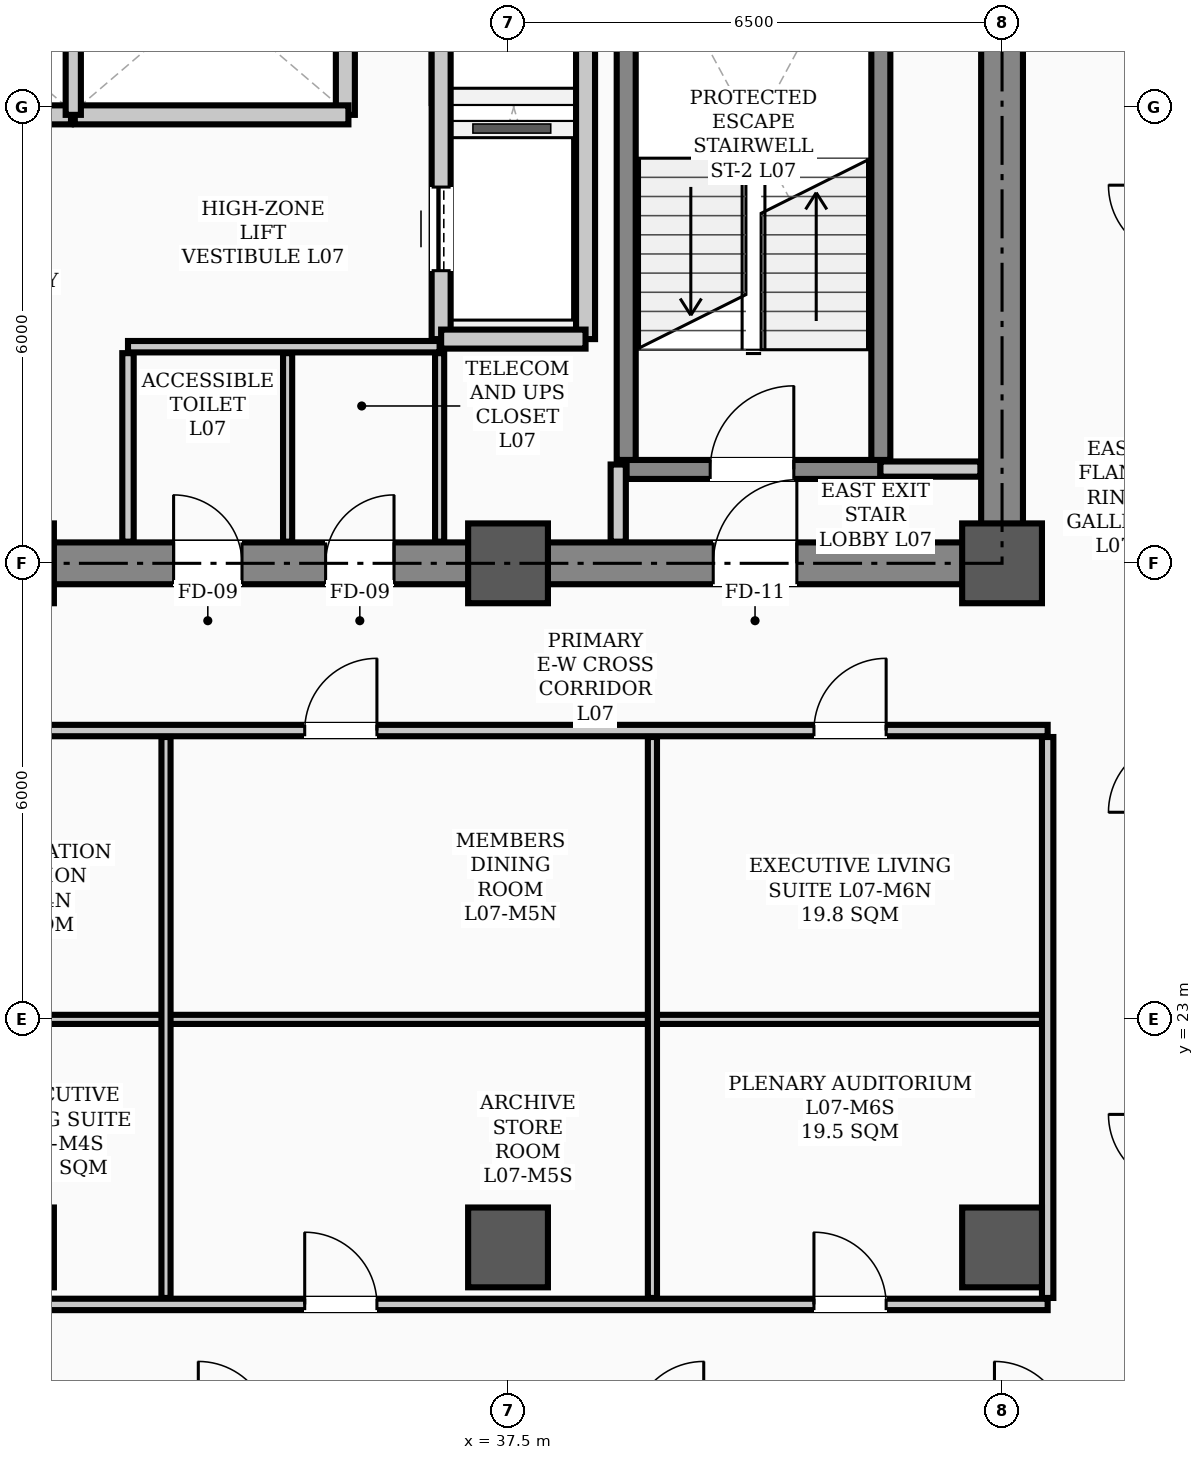
"""IFC4 building model, lengths in metres.
Left out: names, types, materials, properties, quantities, classifications, styles, units other than length and angle.
Written with IfcOpenShell. Run it as: python <this file> out.ifc"""

import sys

from ifc_helpers import new_model, si_unit, direction, frame, frame_2d, origin, origin_2d, place, context, subcontext, project, spatial, rectangle, hollow_rectangle, extrude, element, fill, save


model = new_model("IFC4")
c1 = context("Model", 3, precision=1e-05, world=origin(), true_north=direction((0.0, 1.0)))
c2 = subcontext(c1, "Body", "Model", "MODEL_VIEW")
j1 = project(units=[si_unit("LENGTHUNIT", "METRE"), si_unit("PLANEANGLEUNIT", "RADIAN")], contexts=[c1])
p1 = place(None, origin())
s1 = spatial("IfcSite", under=j1, at=p1, CompositionType="ELEMENT")
p2 = place(p1, origin())
s2 = spatial("IfcBuilding", under=s1, at=p2, CompositionType="ELEMENT")
p3 = place(p2, frame((0.0, 0.0, 30.4)))
s3 = spatial("IfcBuildingStorey", under=s2, at=p3, CompositionType="ELEMENT", Elevation=30.4)
for number, where, z_axis, x_axis in (
    (1, (31.0, 29.0, 0.0), (0.0, 0.0, 1.0), (1.0, 0.0, 0.0)),
    (2, (37.5, 29.0, 0.0), (0.0, 0.0, 1.0), (1.0, 0.0, 0.0)),
    (3, (44.0, 29.0, 0.0), (0.0, 0.0, 1.0), (1.0, 0.0, 0.0)),
    (4, (31.0, 20.0, 0.0), (0.0, 0.0, 1.0), (1.0, 0.0, 0.0)),
    (5, (37.5, 20.0, 0.0), (0.0, 0.0, 1.0), (1.0, 0.0, 0.0)),
    (6, (44.0, 20.0, 0.0), (0.0, 0.0, 1.0), (1.0, 0.0, 0.0)),
):
    element("IfcColumn", number, at=place(p3, frame(where, z_axis=z_axis, x_axis=x_axis)), inside=s3, PredefinedType="COLUMN", context=c2, shape_type="SweptSolid", body=[
        extrude(hollow_rectangle(XDim=1.05, YDim=1.05, WallThickness=0.038, InnerFilletRadius=0.019, OuterFilletRadius=0.057, at=origin_2d()), origin(), (0.0, 0.0, 1.0), 3.9),
    ])
p4 = place(p3, frame((13.5, 29.0, 0.0), z_axis=(0.0, 0.0, 1.0), x_axis=(1.0, 0.0, 0.0)))
e7 = element("IfcWall", 7, at=p4, inside=s3, PredefinedType="SHEAR", context=c2, shape_type="SweptSolid", body=[
    extrude(rectangle(XDim=30.5, YDim=0.55, at=frame_2d((15.25, 0.0))), origin(), (0.0, 0.0, 1.0), 3.72),
])
p5 = place(p4, frame((1.75, 0.0, 0.0)))
e8 = element("IfcOpeningElement", 8, at=p5, cuts=e7, PredefinedType="OPENING", context=c2, shape_type="SweptSolid", body=[
    extrude(rectangle(XDim=1.1, YDim=2.08, at=frame_2d((0.55, 1.04))), frame((0.0, 0.285, 0.0), z_axis=(0.0, -1.0, 0.0), x_axis=(1.0, 0.0, 0.0)), (0.0, 0.0, 1.0), 0.57),
])
p6 = place(p4, frame((26.7, 0.0, 0.0)))
e9 = element("IfcOpeningElement", 9, at=p6, cuts=e7, PredefinedType="OPENING", context=c2, shape_type="SweptSolid", body=[
    extrude(rectangle(XDim=1.1, YDim=2.08, at=frame_2d((0.55, 1.04))), frame((0.0, 0.285, 0.0), z_axis=(0.0, -1.0, 0.0), x_axis=(1.0, 0.0, 0.0)), (0.0, 0.0, 1.0), 0.57),
])
p7 = place(p4, frame((6.8, 0.0, 0.0)))
e10 = element("IfcOpeningElement", 10, at=p7, cuts=e7, PredefinedType="OPENING", context=c2, shape_type="SweptSolid", body=[
    extrude(rectangle(XDim=1.1, YDim=2.08, at=frame_2d((0.55, 1.04))), frame((0.0, 0.285, 0.0), z_axis=(0.0, -1.0, 0.0), x_axis=(1.0, 0.0, 0.0)), (0.0, 0.0, 1.0), 0.57),
])
p8 = place(p4, frame((13.2, 0.0, 0.0)))
e11 = element("IfcOpeningElement", 11, at=p8, cuts=e7, PredefinedType="OPENING", context=c2, shape_type="SweptSolid", body=[
    extrude(rectangle(XDim=1.6, YDim=2.08, at=frame_2d((0.8, 1.04))), frame((0.0, 0.285, 0.0), z_axis=(0.0, -1.0, 0.0), x_axis=(1.0, 0.0, 0.0)), (0.0, 0.0, 1.0), 0.57),
])
p9 = place(p4, frame((19.6, 0.0, 0.0)))
e12 = element("IfcOpeningElement", 12, at=p9, cuts=e7, PredefinedType="OPENING", context=c2, shape_type="SweptSolid", body=[
    extrude(rectangle(XDim=0.9, YDim=2.08, at=frame_2d((0.45, 1.04))), frame((0.0, 0.285, 0.0), z_axis=(0.0, -1.0, 0.0), x_axis=(1.0, 0.0, 0.0)), (0.0, 0.0, 1.0), 0.57),
])
p10 = place(p4, frame((21.6, 0.0, 0.0)))
e13 = element("IfcOpeningElement", 13, at=p10, cuts=e7, PredefinedType="OPENING", context=c2, shape_type="SweptSolid", body=[
    extrude(rectangle(XDim=0.9, YDim=2.08, at=frame_2d((0.45, 1.04))), frame((0.0, 0.285, 0.0), z_axis=(0.0, -1.0, 0.0), x_axis=(1.0, 0.0, 0.0)), (0.0, 0.0, 1.0), 0.57),
])
p11 = place(p3, frame((44.0, 29.35, 0.0), z_axis=(0.0, 0.0, 1.0), x_axis=(0.0, 1.0, 0.0)))
e14 = element("IfcWall", 14, at=p11, inside=s3, PredefinedType="SHEAR", context=c2, shape_type="SweptSolid", body=[
    extrude(rectangle(XDim=8.6, YDim=0.55, at=frame_2d((4.3, 0.0))), origin(), (0.0, 0.0, 1.0), 3.72),
])
p12 = place(p3, frame((39.06, 30.235, 0.0), z_axis=(0.0, 0.0, 1.0), x_axis=(1.0, 0.0, 0.0)))
e15 = element("IfcWall", 15, at=p12, inside=s3, PredefinedType="STANDARD", context=c2, shape_type="SweptSolid", body=[
    extrude(rectangle(XDim=3.34, YDim=0.25, at=frame_2d((1.67, 0.0))), origin(), (0.0, 0.0, 1.0), 3.72),
])
p13 = place(p12, frame((1.1, 0.0, 0.0)))
e16 = element("IfcOpeningElement", 16, at=p13, cuts=e15, PredefinedType="OPENING", context=c2, shape_type="SweptSolid", body=[
    extrude(rectangle(XDim=1.1, YDim=2.08, at=frame_2d((0.55, 1.04))), frame((0.0, 0.135, 0.0), z_axis=(0.0, -1.0, 0.0), x_axis=(1.0, 0.0, 0.0)), (0.0, 0.0, 1.0), 0.27),
])
for number, where, z_axis, x_axis in (
    (17, (39.055, 30.36, 0.0), (0.0, 0.0, 1.0), (0.0, 1.0, 0.0)),
    (18, (42.405, 30.36, 0.0), (0.0, 0.0, 1.0), (0.0, 1.0, 0.0)),
):
    element("IfcWall", number, at=place(p3, frame(where, z_axis=z_axis, x_axis=x_axis)), inside=s3, PredefinedType="STANDARD", context=c2, shape_type="SweptSolid", body=[
        extrude(rectangle(XDim=7.184, YDim=0.25, at=frame_2d((3.592, 0.0))), origin(), (0.0, 0.0, 1.0), 3.72),
    ])
p14 = place(p3, frame((36.62, 31.95, 0.0), z_axis=(0.0, 0.0, 1.0), x_axis=(0.0, 1.0, 0.0)))
e19 = element("IfcWall", 19, at=p14, inside=s3, PredefinedType="STANDARD", context=c2, shape_type="SweptSolid", body=[
    extrude(rectangle(XDim=6.0, YDim=0.25, at=frame_2d((3.0, 0.0))), origin(), (0.0, 0.0, 1.0), 3.3),
])
p15 = place(p14, frame((0.9, 0.0, 0.0)))
e20 = element("IfcOpeningElement", 20, at=p15, cuts=e19, PredefinedType="OPENING", context=c2, shape_type="SweptSolid", body=[
    extrude(rectangle(XDim=1.1, YDim=2.08, at=frame_2d((0.55, 1.04))), frame((0.0, 0.135, 0.0), z_axis=(0.0, -1.0, 0.0), x_axis=(1.0, 0.0, 0.0)), (0.0, 0.0, 1.0), 0.27),
])
p16 = place(p14, frame((4.0, 0.0, 0.0)))
e21 = element("IfcOpeningElement", 21, at=p16, cuts=e19, PredefinedType="OPENING", context=c2, shape_type="SweptSolid", body=[
    extrude(rectangle(XDim=1.1, YDim=2.08, at=frame_2d((0.55, 1.04))), frame((0.0, 0.135, 0.0), z_axis=(0.0, -1.0, 0.0), x_axis=(1.0, 0.0, 0.0)), (0.0, 0.0, 1.0), 0.27),
])
p17 = place(p3, frame((38.52, 31.95, 0.0), z_axis=(0.0, 0.0, 1.0), x_axis=(0.0, 1.0, 0.0)))
e22 = element("IfcWall", 22, at=p17, inside=s3, PredefinedType="STANDARD", context=c2, shape_type="SweptSolid", body=[
    extrude(rectangle(XDim=6.0, YDim=0.25, at=frame_2d((3.0, 0.0))), origin(), (0.0, 0.0, 1.0), 3.3),
])
p18 = place(p3, frame((36.62, 31.95, 0.0), z_axis=(0.0, 0.0, 1.0), x_axis=(1.0, 0.0, 0.0)))
e23 = element("IfcWall", 23, at=p18, inside=s3, PredefinedType="STANDARD", context=c2, shape_type="SweptSolid", body=[
    extrude(rectangle(XDim=1.9, YDim=0.25, at=frame_2d((0.95, 0.0))), origin(), (0.0, 0.0, 1.0), 3.48),
])
p19 = place(p3, frame((35.36, 34.9, 0.0), z_axis=(0.0, 0.0, 1.0), x_axis=(0.0, 1.0, 0.0)))
e24 = element("IfcWall", 24, at=p19, inside=s3, PredefinedType="STANDARD", context=c2, shape_type="SweptSolid", body=[
    extrude(rectangle(XDim=3.05, YDim=0.25, at=frame_2d((1.525, 0.0))), origin(), (0.0, 0.0, 1.0), 3.3),
])
p20 = place(p3, frame((28.2, 34.9, 0.0), z_axis=(0.0, 0.0, 1.0), x_axis=(1.0, 0.0, 0.0)))
e25 = element("IfcWall", 25, at=p20, inside=s3, PredefinedType="STANDARD", context=c2, shape_type="SweptSolid", body=[
    extrude(rectangle(XDim=3.55, YDim=0.25, at=frame_2d((1.775, 0.0))), origin(), (0.0, 0.0, 1.0), 3.72),
])
p21 = place(p3, frame((31.8, 34.9, 0.0), z_axis=(0.0, 0.0, 1.0), x_axis=(1.0, 0.0, 0.0)))
e26 = element("IfcWall", 26, at=p21, inside=s3, PredefinedType="STANDARD", context=c2, shape_type="SweptSolid", body=[
    extrude(rectangle(XDim=3.6, YDim=0.25, at=frame_2d((1.8, 0.0))), origin(), (0.0, 0.0, 1.0), 3.72),
])
p22 = place(p3, frame((42.4, 30.24, 0.0), z_axis=(0.0, 0.0, 1.0), x_axis=(1.0, 0.0, 0.0)))
e27 = element("IfcWall", 27, at=p22, inside=s3, PredefinedType="STANDARD", context=c2, shape_type="SweptSolid", body=[
    extrude(rectangle(XDim=1.315, YDim=0.2, at=frame_2d((0.658, 0.0))), origin(), (0.0, 0.0, 1.0), 3.1),
])
p23 = place(p3, frame((32.5, 31.85, 0.0), z_axis=(0.0, 0.0, 1.0), x_axis=(1.0, 0.0, 0.0)))
e28 = element("IfcWall", 28, at=p23, inside=s3, PredefinedType="PARTITIONING", context=c2, shape_type="SweptSolid", body=[
    extrude(rectangle(XDim=4.1, YDim=0.15, at=frame_2d((2.05, 0.0))), origin(), (0.0, 0.0, 1.0), 3.72),
])
p24 = place(p3, frame((12.9, 26.8, 0.0), z_axis=(0.0, 0.0, 1.0), x_axis=(1.0, 0.0, 0.0)))
e29 = element("IfcWall", 29, at=p24, inside=s3, PredefinedType="PARTITIONING", context=c2, shape_type="SweptSolid", body=[
    extrude(rectangle(XDim=31.7, YDim=0.15, at=frame_2d((15.85, 0.0))), origin(), (0.0, 0.0, 1.0), 3.1),
])
p25 = place(p24, frame((13.6, 0.0, 0.0)))
e30 = element("IfcOpeningElement", 30, at=p25, cuts=e29, PredefinedType="OPENING", context=c2, shape_type="SweptSolid", body=[
    extrude(rectangle(XDim=1.6, YDim=2.08, at=frame_2d((0.8, 1.04))), frame((0.0, 0.085, 0.0), z_axis=(0.0, -1.0, 0.0), x_axis=(1.0, 0.0, 0.0)), (0.0, 0.0, 1.0), 0.17),
])
p26 = place(p24, frame((1.775, 0.0, 0.0)))
e31 = element("IfcOpeningElement", 31, at=p26, cuts=e29, PredefinedType="OPENING", context=c2, shape_type="SweptSolid", body=[
    extrude(rectangle(XDim=0.95, YDim=2.08, at=frame_2d((0.475, 1.04))), frame((0.0, 0.085, 0.0), z_axis=(0.0, -1.0, 0.0), x_axis=(1.0, 0.0, 0.0)), (0.0, 0.0, 1.0), 0.17),
])
p27 = place(p24, frame((6.225, 0.0, 0.0)))
e32 = element("IfcOpeningElement", 32, at=p27, cuts=e29, PredefinedType="OPENING", context=c2, shape_type="SweptSolid", body=[
    extrude(rectangle(XDim=0.95, YDim=2.08, at=frame_2d((0.475, 1.04))), frame((0.0, 0.085, 0.0), z_axis=(0.0, -1.0, 0.0), x_axis=(1.0, 0.0, 0.0)), (0.0, 0.0, 1.0), 0.17),
])
p28 = place(p24, frame((10.625, 0.0, 0.0)))
e33 = element("IfcOpeningElement", 33, at=p28, cuts=e29, PredefinedType="OPENING", context=c2, shape_type="SweptSolid", body=[
    extrude(rectangle(XDim=0.95, YDim=2.08, at=frame_2d((0.475, 1.04))), frame((0.0, 0.085, 0.0), z_axis=(0.0, -1.0, 0.0), x_axis=(1.0, 0.0, 0.0)), (0.0, 0.0, 1.0), 0.17),
])
p29 = place(p24, frame((16.075, 0.0, 0.0)))
e34 = element("IfcOpeningElement", 34, at=p29, cuts=e29, PredefinedType="OPENING", context=c2, shape_type="SweptSolid", body=[
    extrude(rectangle(XDim=0.95, YDim=2.08, at=frame_2d((0.475, 1.04))), frame((0.0, 0.085, 0.0), z_axis=(0.0, -1.0, 0.0), x_axis=(1.0, 0.0, 0.0)), (0.0, 0.0, 1.0), 0.17),
])
p30 = place(p24, frame((21.925, 0.0, 0.0)))
e35 = element("IfcOpeningElement", 35, at=p30, cuts=e29, PredefinedType="OPENING", context=c2, shape_type="SweptSolid", body=[
    extrude(rectangle(XDim=0.95, YDim=2.08, at=frame_2d((0.475, 1.04))), frame((0.0, 0.085, 0.0), z_axis=(0.0, -1.0, 0.0), x_axis=(1.0, 0.0, 0.0)), (0.0, 0.0, 1.0), 0.17),
])
p31 = place(p24, frame((28.625, 0.0, 0.0)))
e36 = element("IfcOpeningElement", 36, at=p31, cuts=e29, PredefinedType="OPENING", context=c2, shape_type="SweptSolid", body=[
    extrude(rectangle(XDim=0.95, YDim=2.08, at=frame_2d((0.475, 1.04))), frame((0.0, 0.085, 0.0), z_axis=(0.0, -1.0, 0.0), x_axis=(1.0, 0.0, 0.0)), (0.0, 0.0, 1.0), 0.17),
])
p32 = place(p3, frame((28.4, 19.25, 0.0), z_axis=(0.0, 0.0, 1.0), x_axis=(1.0, 0.0, 0.0)))
e37 = element("IfcWall", 37, at=p32, inside=s3, PredefinedType="PARTITIONING", context=c2, shape_type="SweptSolid", body=[
    extrude(rectangle(XDim=16.2, YDim=0.15, at=frame_2d((8.1, 0.0))), origin(), (0.0, 0.0, 1.0), 3.1),
])
p33 = place(p32, frame((0.575, 0.0, 0.0)))
e38 = element("IfcOpeningElement", 38, at=p33, cuts=e37, PredefinedType="OPENING", context=c2, shape_type="SweptSolid", body=[
    extrude(rectangle(XDim=0.95, YDim=2.08, at=frame_2d((0.475, 1.04))), frame((0.0, 0.085, 0.0), z_axis=(0.0, -1.0, 0.0), x_axis=(1.0, 0.0, 0.0)), (0.0, 0.0, 1.0), 0.17),
])
p34 = place(p32, frame((6.425, 0.0, 0.0)))
e39 = element("IfcOpeningElement", 39, at=p34, cuts=e37, PredefinedType="OPENING", context=c2, shape_type="SweptSolid", body=[
    extrude(rectangle(XDim=0.95, YDim=2.08, at=frame_2d((0.475, 1.04))), frame((0.0, 0.085, 0.0), z_axis=(0.0, -1.0, 0.0), x_axis=(1.0, 0.0, 0.0)), (0.0, 0.0, 1.0), 0.17),
])
p35 = place(p32, frame((13.125, 0.0, 0.0)))
e40 = element("IfcOpeningElement", 40, at=p35, cuts=e37, PredefinedType="OPENING", context=c2, shape_type="SweptSolid", body=[
    extrude(rectangle(XDim=0.95, YDim=2.08, at=frame_2d((0.475, 1.04))), frame((0.0, 0.085, 0.0), z_axis=(0.0, -1.0, 0.0), x_axis=(1.0, 0.0, 0.0)), (0.0, 0.0, 1.0), 0.17),
])
p36 = place(p3, frame((28.4, 23.0, 0.0), z_axis=(0.0, 0.0, 1.0), x_axis=(1.0, 0.0, 0.0)))
e41 = element("IfcWall", 41, at=p36, inside=s3, PredefinedType="PARTITIONING", context=c2, shape_type="SweptSolid", body=[
    extrude(rectangle(XDim=4.6, YDim=0.12, at=frame_2d((2.3, 0.0))), origin(), (0.0, 0.0, 1.0), 3.1),
])
p37 = place(p3, frame((33.0, 23.0, 0.0), z_axis=(0.0, 0.0, 1.0), x_axis=(1.0, 0.0, 0.0)))
e42 = element("IfcWall", 42, at=p37, inside=s3, PredefinedType="PARTITIONING", context=c2, shape_type="SweptSolid", body=[
    extrude(rectangle(XDim=6.4, YDim=0.12, at=frame_2d((3.2, 0.0))), origin(), (0.0, 0.0, 1.0), 3.1),
])
p38 = place(p3, frame((39.4, 23.0, 0.0), z_axis=(0.0, 0.0, 1.0), x_axis=(1.0, 0.0, 0.0)))
e43 = element("IfcWall", 43, at=p38, inside=s3, PredefinedType="PARTITIONING", context=c2, shape_type="SweptSolid", body=[
    extrude(rectangle(XDim=5.2, YDim=0.12, at=frame_2d((2.6, 0.0))), origin(), (0.0, 0.0, 1.0), 3.1),
])
p39 = place(p3, frame((38.95, 29.285, 0.0), z_axis=(0.0, 0.0, 1.0), x_axis=(0.0, 1.0, 0.0)))
e44 = element("IfcWall", 44, at=p39, inside=s3, PredefinedType="STANDARD", context=c2, shape_type="SweptSolid", body=[
    extrude(rectangle(XDim=1.015, YDim=0.2, at=frame_2d((0.508, 0.0))), origin(), (0.0, 0.0, 1.0), 3.3),
])
p40 = place(p3, frame((32.5, 29.285, 0.0), z_axis=(0.0, 0.0, 1.0), x_axis=(0.0, 1.0, 0.0)))
e45 = element("IfcWall", 45, at=p40, inside=s3, PredefinedType="PARTITIONING", context=c2, shape_type="SweptSolid", body=[
    extrude(rectangle(XDim=2.48, YDim=0.15, at=frame_2d((1.24, 0.0))), origin(), (0.0, 0.0, 1.0), 3.3),
])
for number, where, z_axis, x_axis in (
    (46, (36.6, 29.285, 0.0), (0.0, 0.0, 1.0), (0.0, 1.0, 0.0)),
    (47, (34.6, 29.285, 0.0), (0.0, 0.0, 1.0), (0.0, 1.0, 0.0)),
):
    element("IfcWall", number, at=place(p3, frame(where, z_axis=z_axis, x_axis=x_axis)), inside=s3, PredefinedType="PARTITIONING", context=c2, shape_type="SweptSolid", body=[
        extrude(rectangle(XDim=2.48, YDim=0.12, at=frame_2d((1.24, 0.0))), origin(), (0.0, 0.0, 1.0), 3.3),
    ])
p41 = place(p3, frame((44.6, 19.335, 0.0), z_axis=(0.0, 0.0, 1.0), x_axis=(0.0, 1.0, 0.0)))
e48 = element("IfcWall", 48, at=p41, inside=s3, PredefinedType="PARTITIONING", context=c2, shape_type="SweptSolid", body=[
    extrude(rectangle(XDim=7.38, YDim=0.15, at=frame_2d((3.69, 0.0))), origin(), (0.0, 0.0, 1.0), 3.0),
])
for number, where, z_axis, x_axis in (
    (49, (33.0, 19.335, 0.0), (0.0, 0.0, 1.0), (0.0, 1.0, 0.0)),
    (50, (39.4, 19.335, 0.0), (0.0, 0.0, 1.0), (0.0, 1.0, 0.0)),
):
    element("IfcWall", number, at=place(p3, frame(where, z_axis=z_axis, x_axis=x_axis)), inside=s3, PredefinedType="PARTITIONING", context=c2, shape_type="SweptSolid", body=[
        extrude(rectangle(XDim=7.38, YDim=0.12, at=frame_2d((3.69, 0.0))), origin(), (0.0, 0.0, 1.0), 3.0),
    ])
p42 = place(p3, frame((31.78, 34.9, 0.0), z_axis=(0.0, 0.0, 1.0), x_axis=(0.0, 1.0, 0.0)))
e51 = element("IfcWall", 51, at=p42, inside=s3, PredefinedType="STANDARD", context=c2, shape_type="SweptSolid", body=[
    extrude(rectangle(XDim=3.12, YDim=0.2, at=frame_2d((1.56, 0.0))), origin(), (0.0, 0.0, 1.0), 3.3),
])
p43 = place(p13, origin())
e52 = element("IfcDoor", 52, at=p43, inside=s3, OperationType="SINGLE_SWING_RIGHT", PredefinedType="DOOR", context=c2, shape_type="SweptSolid", body=[
    extrude(rectangle(XDim=1.1, YDim=2.08, at=frame_2d((0.55, 1.04))), frame((0.0, 0.025, 0.0), z_axis=(0.0, -1.0, 0.0), x_axis=(1.0, 0.0, 0.0)), (0.0, 0.0, 1.0), 0.05),
])
fill(e16, e52)
p44 = place(p6, origin())
e53 = element("IfcDoor", 53, at=p44, inside=s3, OperationType="SINGLE_SWING_RIGHT", PredefinedType="DOOR", context=c2, shape_type="SweptSolid", body=[
    extrude(rectangle(XDim=1.1, YDim=2.08, at=frame_2d((0.55, 1.04))), frame((0.0, 0.025, 0.0), z_axis=(0.0, -1.0, 0.0), x_axis=(1.0, 0.0, 0.0)), (0.0, 0.0, 1.0), 0.05),
])
fill(e9, e53)
p45 = place(p9, origin())
e54 = element("IfcDoor", 54, at=p45, inside=s3, OperationType="SINGLE_SWING_LEFT", PredefinedType="DOOR", context=c2, shape_type="SweptSolid", body=[
    extrude(rectangle(XDim=0.9, YDim=2.08, at=frame_2d((0.45, 1.04))), frame((0.0, 0.025, 0.0), z_axis=(0.0, -1.0, 0.0), x_axis=(1.0, 0.0, 0.0)), (0.0, 0.0, 1.0), 0.05),
])
fill(e12, e54)
p46 = place(p10, origin())
e55 = element("IfcDoor", 55, at=p46, inside=s3, OperationType="SINGLE_SWING_RIGHT", PredefinedType="DOOR", context=c2, shape_type="SweptSolid", body=[
    extrude(rectangle(XDim=0.9, YDim=2.08, at=frame_2d((0.45, 1.04))), frame((0.0, 0.025, 0.0), z_axis=(0.0, -1.0, 0.0), x_axis=(1.0, 0.0, 0.0)), (0.0, 0.0, 1.0), 0.05),
])
fill(e13, e55)
p47 = place(p30, origin())
e56 = element("IfcDoor", 56, at=p47, inside=s3, OperationType="SINGLE_SWING_RIGHT", PredefinedType="DOOR", context=c2, shape_type="SweptSolid", body=[
    extrude(rectangle(XDim=0.95, YDim=2.08, at=frame_2d((0.475, 1.04))), frame((0.0, 0.025, 0.0), z_axis=(0.0, -1.0, 0.0), x_axis=(1.0, 0.0, 0.0)), (0.0, 0.0, 1.0), 0.05),
])
fill(e35, e56)
p48 = place(p34, origin())
e57 = element("IfcDoor", 57, at=p48, inside=s3, OperationType="SINGLE_SWING_LEFT", PredefinedType="DOOR", context=c2, shape_type="SweptSolid", body=[
    extrude(rectangle(XDim=0.95, YDim=2.08, at=frame_2d((0.475, 1.04))), frame((0.0, 0.025, 0.0), z_axis=(0.0, -1.0, 0.0), x_axis=(1.0, 0.0, 0.0)), (0.0, 0.0, 1.0), 0.05),
])
fill(e39, e57)
p49 = place(p31, origin())
e58 = element("IfcDoor", 58, at=p49, inside=s3, OperationType="SINGLE_SWING_RIGHT", PredefinedType="DOOR", context=c2, shape_type="SweptSolid", body=[
    extrude(rectangle(XDim=0.95, YDim=2.08, at=frame_2d((0.475, 1.04))), frame((0.0, 0.025, 0.0), z_axis=(0.0, -1.0, 0.0), x_axis=(1.0, 0.0, 0.0)), (0.0, 0.0, 1.0), 0.05),
])
fill(e36, e58)
p50 = place(p35, origin())
e59 = element("IfcDoor", 59, at=p50, inside=s3, OperationType="SINGLE_SWING_LEFT", PredefinedType="DOOR", context=c2, shape_type="SweptSolid", body=[
    extrude(rectangle(XDim=0.95, YDim=2.08, at=frame_2d((0.475, 1.04))), frame((0.0, 0.025, 0.0), z_axis=(0.0, -1.0, 0.0), x_axis=(1.0, 0.0, 0.0)), (0.0, 0.0, 1.0), 0.05),
])
fill(e40, e59)
p51 = place(p15, origin())
e60 = element("IfcDoor", 60, at=p51, inside=s3, OperationType="SLIDING_TO_LEFT", PredefinedType="DOOR", context=c2, shape_type="SweptSolid", body=[
    extrude(rectangle(XDim=1.1, YDim=2.08, at=frame_2d((0.55, 1.04))), frame((0.0, 0.025, 0.0), z_axis=(0.0, -1.0, 0.0), x_axis=(1.0, 0.0, 0.0)), (0.0, 0.0, 1.0), 0.05),
])
fill(e20, e60)
save(model, sys.argv[1])
